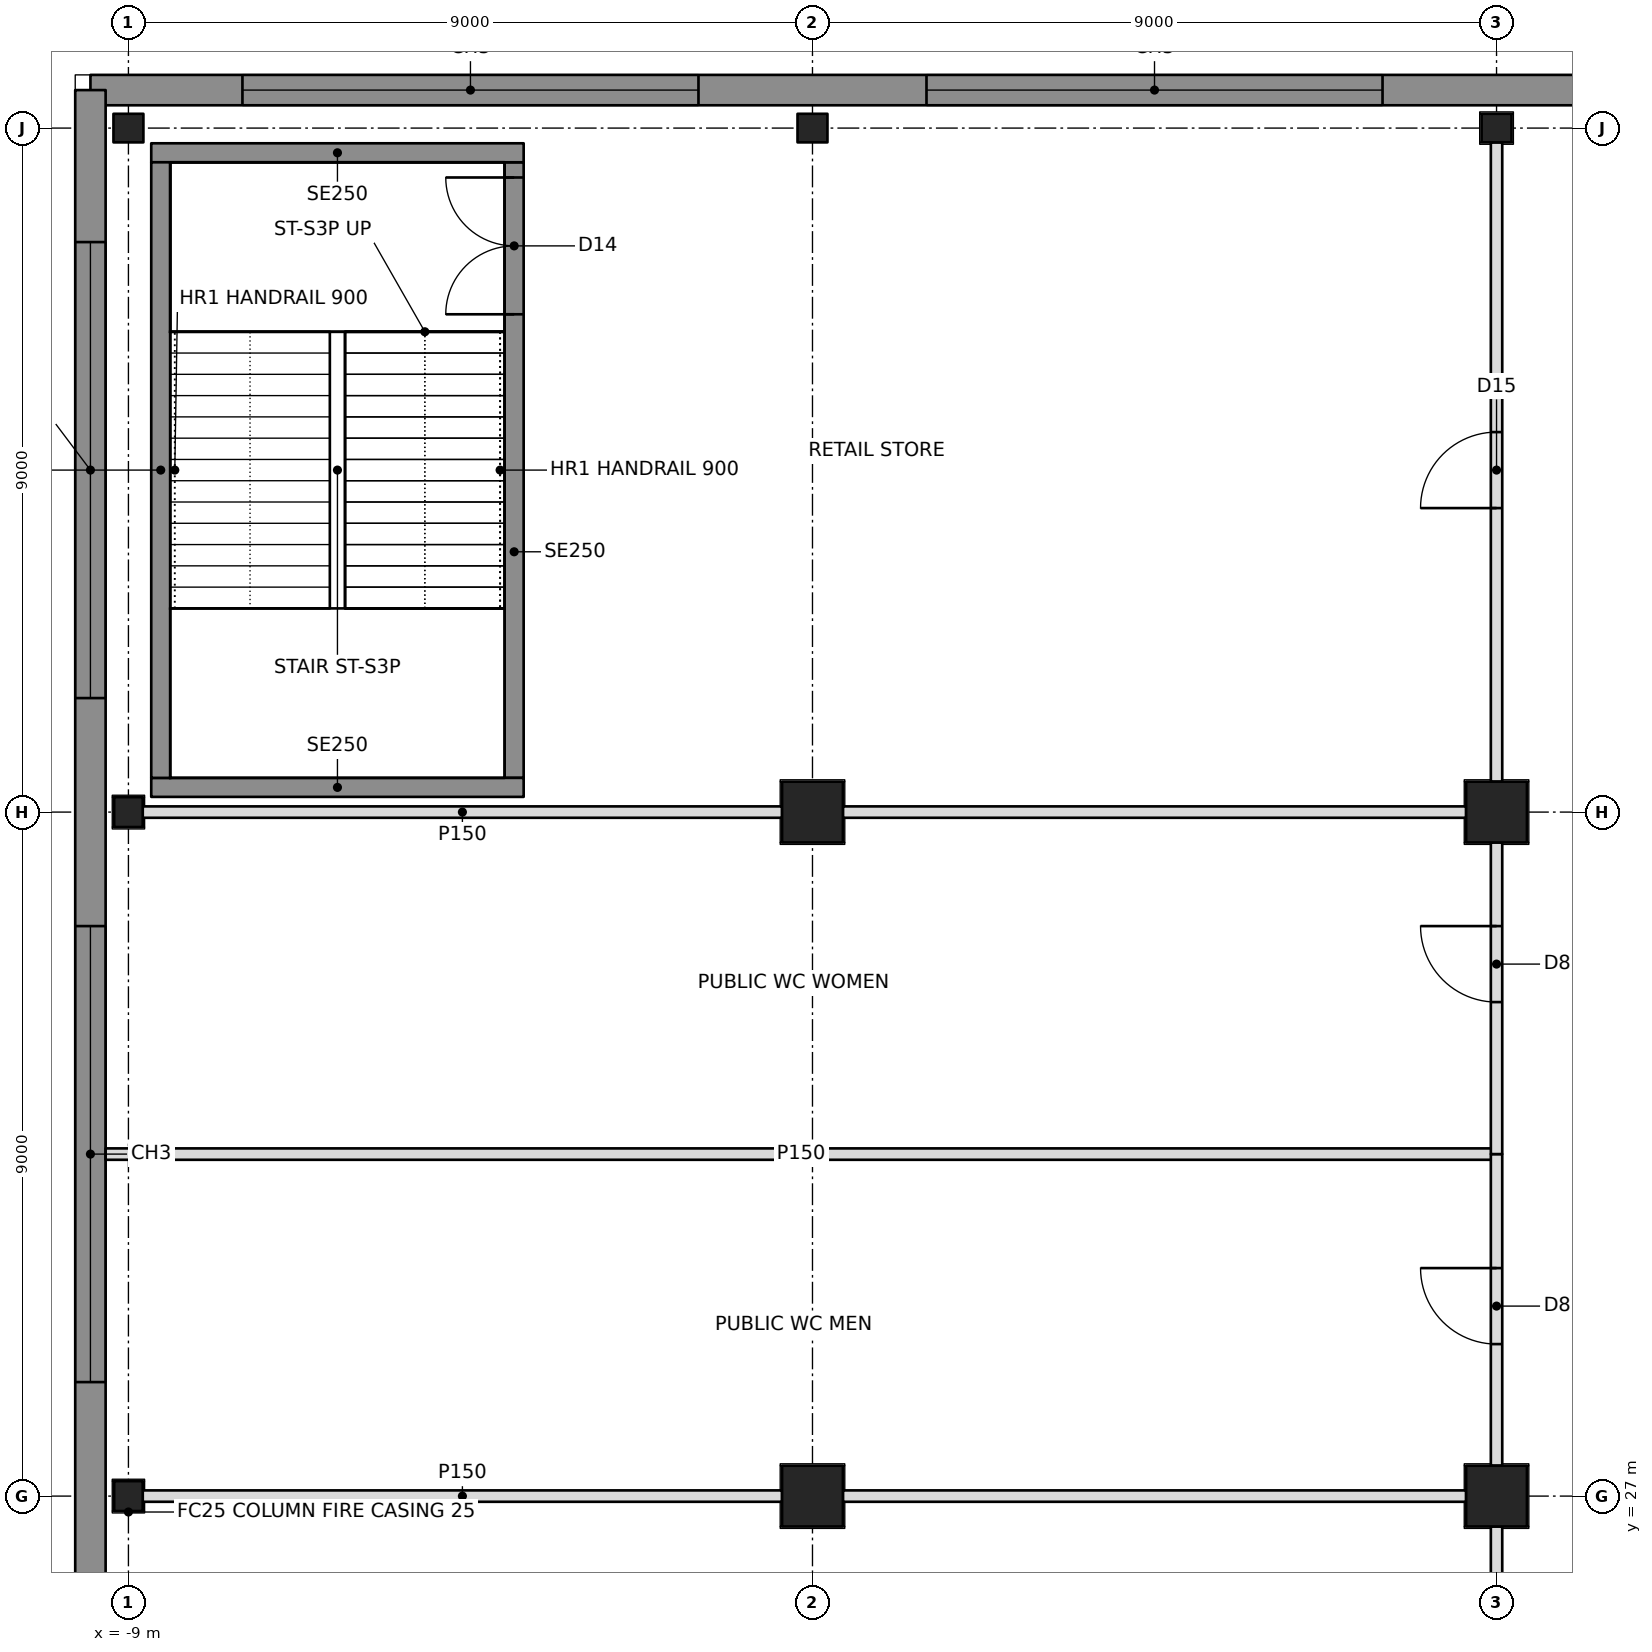
"""IFC4 building model, lengths in metres.
Left out: names, types, materials, properties, quantities, classifications, styles, units other than length and angle.
Written with IfcOpenShell. Run it as: python <this file> out.ifc"""

import sys

from ifc_helpers import new_model, si_unit, direction, frame, frame_2d, origin, origin_2d, place, context, subcontext, project, spatial, rectangle, hollow_rectangle, i_section, extrude, element, fill, save


model = new_model("IFC4")
c1 = context("Model", 3, precision=1e-05, world=origin(), true_north=direction((0.0, 1.0)))
c2 = subcontext(c1, "Body", "Model", "MODEL_VIEW")
j1 = project(units=[si_unit("LENGTHUNIT", "METRE"), si_unit("PLANEANGLEUNIT", "RADIAN")], contexts=[c1])
p1 = place(None, origin())
s1 = spatial("IfcSite", under=j1, at=p1, CompositionType="ELEMENT")
p2 = place(p1, origin())
s2 = spatial("IfcBuilding", under=s1, at=p2, CompositionType="ELEMENT")
p3 = place(p2, frame((0.0, 0.0, 6.0)))
s3 = spatial("IfcBuildingStorey", under=s2, at=p3, CompositionType="ELEMENT", Elevation=6.0)
for number, where, z_axis, x_axis in (
    (1, (-9.0, 27.0, 0.0), (0.0, 0.0, 1.0), (0.0, 1.0, 0.0)),
    (2, (-9.0, 36.0, 0.0), (0.0, 0.0, 1.0), (0.0, 1.0, 0.0)),
    (3, (-9.0, 45.0, 0.0), (0.0, 0.0, 1.0), (1.0, 0.0, 0.0)),
):
    element("IfcColumn", number, at=place(p3, frame(where, z_axis=z_axis, x_axis=x_axis)), inside=s3, PredefinedType="COLUMN", context=c2, shape_type="SweptSolid", body=[
        extrude(i_section(OverallWidth=0.394, OverallDepth=0.376, WebThickness=0.017, FlangeThickness=0.028, at=origin_2d()), origin(), (0.0, 0.0, 1.0), 5.0),
    ])
for number, where, z_axis, x_axis in (
    (4, (0.0, 27.0, 0.0), (0.0, 0.0, 1.0), (0.0, 1.0, 0.0)),
    (5, (0.0, 36.0, 0.0), (0.0, 0.0, 1.0), (1.0, 0.0, 0.0)),
):
    element("IfcColumn", number, at=place(p3, frame(where, z_axis=z_axis, x_axis=x_axis)), inside=s3, PredefinedType="COLUMN", context=c2, shape_type="SweptSolid", body=[
        extrude(hollow_rectangle(XDim=0.8, YDim=0.8, WallThickness=0.1, at=origin_2d()), origin(), (0.0, 0.0, 1.0), 5.0),
    ])
p4 = place(p3, frame((0.0, 45.0, 0.0), z_axis=(0.0, 0.0, 1.0), x_axis=(1.0, 0.0, 0.0)))
e6 = element("IfcColumn", 6, at=p4, inside=s3, PredefinedType="COLUMN", context=c2, shape_type="SweptSolid", body=[
    extrude(i_section(OverallWidth=0.394, OverallDepth=0.376, WebThickness=0.017, FlangeThickness=0.028, at=origin_2d()), origin(), (0.0, 0.0, 1.0), 5.0),
])
for number, where, z_axis, x_axis in (
    (7, (9.0, 27.0, 0.0), (0.0, 0.0, 1.0), (1.0, 0.0, 0.0)),
    (8, (9.0, 36.0, 0.0), (0.0, 0.0, 1.0), (1.0, 0.0, 0.0)),
):
    element("IfcColumn", number, at=place(p3, frame(where, z_axis=z_axis, x_axis=x_axis)), inside=s3, PredefinedType="COLUMN", context=c2, shape_type="SweptSolid", body=[
        extrude(hollow_rectangle(XDim=0.8, YDim=0.8, WallThickness=0.1, at=origin_2d()), origin(), (0.0, 0.0, 1.0), 5.0),
    ])
p5 = place(p3, frame((9.0, 45.0, 0.0), z_axis=(0.0, 0.0, 1.0), x_axis=(1.0, 0.0, 0.0)))
e9 = element("IfcColumn", 9, at=p5, inside=s3, PredefinedType="COLUMN", context=c2, shape_type="SweptSolid", body=[
    extrude(i_section(OverallWidth=0.394, OverallDepth=0.376, WebThickness=0.017, FlangeThickness=0.028, at=origin_2d()), origin(), (0.0, 0.0, 1.0), 5.0),
])
p6 = place(p3, frame((63.5, 45.5, 0.0), z_axis=(0.0, 0.0, 1.0), x_axis=(-1.0, 0.0, 0.0)))
e10 = element("IfcWall", 10, at=p6, inside=s3, PredefinedType="SOLIDWALL", context=c2, shape_type="SweptSolid", body=[
    extrude(rectangle(XDim=73.0, YDim=0.4, at=frame_2d((36.5, 0.0))), origin(), (0.0, 0.0, 1.0), 4.75),
])
p7 = place(p6, frame((2.0, 0.0, 0.9)))
e11 = element("IfcOpeningElement", 11, at=p7, cuts=e10, PredefinedType="OPENING", context=c2, shape_type="SweptSolid", body=[
    extrude(rectangle(XDim=6.0, YDim=2.6, at=frame_2d((3.0, 1.3))), frame((0.0, 0.21, 0.0), z_axis=(0.0, -1.0, 0.0), x_axis=(1.0, 0.0, 0.0)), (0.0, 0.0, 1.0), 0.42),
])
p8 = place(p6, frame((11.0, 0.0, 0.9)))
e12 = element("IfcOpeningElement", 12, at=p8, cuts=e10, PredefinedType="OPENING", context=c2, shape_type="SweptSolid", body=[
    extrude(rectangle(XDim=6.0, YDim=2.6, at=frame_2d((3.0, 1.3))), frame((0.0, 0.21, 0.0), z_axis=(0.0, -1.0, 0.0), x_axis=(1.0, 0.0, 0.0)), (0.0, 0.0, 1.0), 0.42),
])
p9 = place(p6, frame((20.0, 0.0, 0.9)))
e13 = element("IfcOpeningElement", 13, at=p9, cuts=e10, PredefinedType="OPENING", context=c2, shape_type="SweptSolid", body=[
    extrude(rectangle(XDim=6.0, YDim=2.6, at=frame_2d((3.0, 1.3))), frame((0.0, 0.21, 0.0), z_axis=(0.0, -1.0, 0.0), x_axis=(1.0, 0.0, 0.0)), (0.0, 0.0, 1.0), 0.42),
])
p10 = place(p6, frame((29.0, 0.0, 0.9)))
e14 = element("IfcOpeningElement", 14, at=p10, cuts=e10, PredefinedType="OPENING", context=c2, shape_type="SweptSolid", body=[
    extrude(rectangle(XDim=6.0, YDim=2.6, at=frame_2d((3.0, 1.3))), frame((0.0, 0.21, 0.0), z_axis=(0.0, -1.0, 0.0), x_axis=(1.0, 0.0, 0.0)), (0.0, 0.0, 1.0), 0.42),
])
p11 = place(p6, frame((38.0, 0.0, 0.9)))
e15 = element("IfcOpeningElement", 15, at=p11, cuts=e10, PredefinedType="OPENING", context=c2, shape_type="SweptSolid", body=[
    extrude(rectangle(XDim=6.0, YDim=2.6, at=frame_2d((3.0, 1.3))), frame((0.0, 0.21, 0.0), z_axis=(0.0, -1.0, 0.0), x_axis=(1.0, 0.0, 0.0)), (0.0, 0.0, 1.0), 0.42),
])
p12 = place(p6, frame((47.0, 0.0, 0.9)))
e16 = element("IfcOpeningElement", 16, at=p12, cuts=e10, PredefinedType="OPENING", context=c2, shape_type="SweptSolid", body=[
    extrude(rectangle(XDim=6.0, YDim=2.6, at=frame_2d((3.0, 1.3))), frame((0.0, 0.21, 0.0), z_axis=(0.0, -1.0, 0.0), x_axis=(1.0, 0.0, 0.0)), (0.0, 0.0, 1.0), 0.42),
])
p13 = place(p6, frame((56.0, 0.0, 0.9)))
e17 = element("IfcOpeningElement", 17, at=p13, cuts=e10, PredefinedType="OPENING", context=c2, shape_type="SweptSolid", body=[
    extrude(rectangle(XDim=6.0, YDim=2.6, at=frame_2d((3.0, 1.3))), frame((0.0, 0.21, 0.0), z_axis=(0.0, -1.0, 0.0), x_axis=(1.0, 0.0, 0.0)), (0.0, 0.0, 1.0), 0.42),
])
p14 = place(p6, frame((65.0, 0.0, 0.9)))
e18 = element("IfcOpeningElement", 18, at=p14, cuts=e10, PredefinedType="OPENING", context=c2, shape_type="SweptSolid", body=[
    extrude(rectangle(XDim=6.0, YDim=2.6, at=frame_2d((3.0, 1.3))), frame((0.0, 0.21, 0.0), z_axis=(0.0, -1.0, 0.0), x_axis=(1.0, 0.0, 0.0)), (0.0, 0.0, 1.0), 0.42),
])
p15 = place(p3, frame((-9.5, 45.5, 0.0), z_axis=(0.0, 0.0, 1.0), x_axis=(0.0, -1.0, 0.0)))
e19 = element("IfcWall", 19, at=p15, inside=s3, PredefinedType="SOLIDWALL", context=c2, shape_type="SweptSolid", body=[
    extrude(rectangle(XDim=73.0, YDim=0.4, at=frame_2d((36.5, 0.0))), origin(), (0.0, 0.0, 1.0), 4.75),
])
p16 = place(p15, frame((2.0, 0.0, 0.9)))
e20 = element("IfcOpeningElement", 20, at=p16, cuts=e19, PredefinedType="OPENING", context=c2, shape_type="SweptSolid", body=[
    extrude(rectangle(XDim=6.0, YDim=2.6, at=frame_2d((3.0, 1.3))), frame((0.0, 0.21, 0.0), z_axis=(0.0, -1.0, 0.0), x_axis=(1.0, 0.0, 0.0)), (0.0, 0.0, 1.0), 0.42),
])
p17 = place(p15, frame((11.0, 0.0, 0.9)))
e21 = element("IfcOpeningElement", 21, at=p17, cuts=e19, PredefinedType="OPENING", context=c2, shape_type="SweptSolid", body=[
    extrude(rectangle(XDim=6.0, YDim=2.6, at=frame_2d((3.0, 1.3))), frame((0.0, 0.21, 0.0), z_axis=(0.0, -1.0, 0.0), x_axis=(1.0, 0.0, 0.0)), (0.0, 0.0, 1.0), 0.42),
])
p18 = place(p15, frame((20.0, 0.0, 0.9)))
e22 = element("IfcOpeningElement", 22, at=p18, cuts=e19, PredefinedType="OPENING", context=c2, shape_type="SweptSolid", body=[
    extrude(rectangle(XDim=6.0, YDim=2.6, at=frame_2d((3.0, 1.3))), frame((0.0, 0.21, 0.0), z_axis=(0.0, -1.0, 0.0), x_axis=(1.0, 0.0, 0.0)), (0.0, 0.0, 1.0), 0.42),
])
p19 = place(p15, frame((29.0, 0.0, 0.9)))
e23 = element("IfcOpeningElement", 23, at=p19, cuts=e19, PredefinedType="OPENING", context=c2, shape_type="SweptSolid", body=[
    extrude(rectangle(XDim=6.0, YDim=2.6, at=frame_2d((3.0, 1.3))), frame((0.0, 0.21, 0.0), z_axis=(0.0, -1.0, 0.0), x_axis=(1.0, 0.0, 0.0)), (0.0, 0.0, 1.0), 0.42),
])
p20 = place(p15, frame((38.0, 0.0, 0.9)))
e24 = element("IfcOpeningElement", 24, at=p20, cuts=e19, PredefinedType="OPENING", context=c2, shape_type="SweptSolid", body=[
    extrude(rectangle(XDim=6.0, YDim=2.6, at=frame_2d((3.0, 1.3))), frame((0.0, 0.21, 0.0), z_axis=(0.0, -1.0, 0.0), x_axis=(1.0, 0.0, 0.0)), (0.0, 0.0, 1.0), 0.42),
])
p21 = place(p15, frame((47.0, 0.0, 0.9)))
e25 = element("IfcOpeningElement", 25, at=p21, cuts=e19, PredefinedType="OPENING", context=c2, shape_type="SweptSolid", body=[
    extrude(rectangle(XDim=6.0, YDim=2.6, at=frame_2d((3.0, 1.3))), frame((0.0, 0.21, 0.0), z_axis=(0.0, -1.0, 0.0), x_axis=(1.0, 0.0, 0.0)), (0.0, 0.0, 1.0), 0.42),
])
p22 = place(p15, frame((56.0, 0.0, 0.9)))
e26 = element("IfcOpeningElement", 26, at=p22, cuts=e19, PredefinedType="OPENING", context=c2, shape_type="SweptSolid", body=[
    extrude(rectangle(XDim=6.0, YDim=2.6, at=frame_2d((3.0, 1.3))), frame((0.0, 0.21, 0.0), z_axis=(0.0, -1.0, 0.0), x_axis=(1.0, 0.0, 0.0)), (0.0, 0.0, 1.0), 0.42),
])
p23 = place(p15, frame((65.0, 0.0, 0.9)))
e27 = element("IfcOpeningElement", 27, at=p23, cuts=e19, PredefinedType="OPENING", context=c2, shape_type="SweptSolid", body=[
    extrude(rectangle(XDim=6.0, YDim=2.6, at=frame_2d((3.0, 1.3))), frame((0.0, 0.21, 0.0), z_axis=(0.0, -1.0, 0.0), x_axis=(1.0, 0.0, 0.0)), (0.0, 0.0, 1.0), 0.42),
])
p24 = place(p3, frame((-8.812, 27.0, 0.0), z_axis=(0.0, 0.0, 1.0), x_axis=(1.0, 0.0, 0.0)))
e28 = element("IfcWall", 28, at=p24, inside=s3, PredefinedType="PARTITIONING", context=c2, shape_type="SweptSolid", body=[
    extrude(rectangle(XDim=8.412, YDim=0.15, at=frame_2d((4.206, 0.0))), origin(), (0.0, 0.0, 1.0), 3.892),
])
p25 = place(p3, frame((0.4, 27.0, 0.0), z_axis=(0.0, 0.0, 1.0), x_axis=(1.0, 0.0, 0.0)))
e29 = element("IfcWall", 29, at=p25, inside=s3, PredefinedType="PARTITIONING", context=c2, shape_type="SweptSolid", body=[
    extrude(rectangle(XDim=8.2, YDim=0.15, at=frame_2d((4.1, 0.0))), origin(), (0.0, 0.0, 1.0), 3.892),
])
p26 = place(p3, frame((-9.3, 31.5, 0.0), z_axis=(0.0, 0.0, 1.0), x_axis=(1.0, 0.0, 0.0)))
e30 = element("IfcWall", 30, at=p26, inside=s3, PredefinedType="PARTITIONING", context=c2, shape_type="SweptSolid", body=[
    extrude(rectangle(XDim=18.3, YDim=0.15, at=frame_2d((9.15, 0.0))), origin(), (0.0, 0.0, 1.0), 3.891),
])
p27 = place(p3, frame((-8.812, 36.0, 0.0), z_axis=(0.0, 0.0, 1.0), x_axis=(1.0, 0.0, 0.0)))
e31 = element("IfcWall", 31, at=p27, inside=s3, PredefinedType="PARTITIONING", context=c2, shape_type="SweptSolid", body=[
    extrude(rectangle(XDim=8.412, YDim=0.15, at=frame_2d((4.206, 0.0))), origin(), (0.0, 0.0, 1.0), 3.892),
])
for number, where, z_axis, x_axis in (
    (32, (0.4, 36.0, 0.0), (0.0, 0.0, 1.0), (1.0, 0.0, 0.0)),
    (33, (9.0, 26.6, 0.0), (0.0, 0.0, 1.0), (0.0, -1.0, 0.0)),
):
    element("IfcWall", number, at=place(p3, frame(where, z_axis=z_axis, x_axis=x_axis)), inside=s3, PredefinedType="PARTITIONING", context=c2, shape_type="SweptSolid", body=[
        extrude(rectangle(XDim=8.2, YDim=0.15, at=frame_2d((4.1, 0.0))), origin(), (0.0, 0.0, 1.0), 3.892),
    ])
p28 = place(p3, frame((9.0, 31.5, 0.0), z_axis=(0.0, 0.0, 1.0), x_axis=(0.0, -1.0, 0.0)))
e34 = element("IfcWall", 34, at=p28, inside=s3, PredefinedType="PARTITIONING", context=c2, shape_type="SweptSolid", body=[
    extrude(rectangle(XDim=4.1, YDim=0.15, at=frame_2d((2.05, 0.0))), origin(), (0.0, 0.0, 1.0), 3.892),
])
p29 = place(p28, frame((1.5, 0.0, 0.0)))
e35 = element("IfcOpeningElement", 35, at=p29, cuts=e34, PredefinedType="OPENING", context=c2, shape_type="SweptSolid", body=[
    extrude(rectangle(XDim=1.0, YDim=2.1, at=frame_2d((0.5, 1.05))), frame((0.0, 0.085, 0.0), z_axis=(0.0, -1.0, 0.0), x_axis=(1.0, 0.0, 0.0)), (0.0, 0.0, 1.0), 0.17),
])
p30 = place(p3, frame((9.0, 35.6, 0.0), z_axis=(0.0, 0.0, 1.0), x_axis=(0.0, -1.0, 0.0)))
e36 = element("IfcWall", 36, at=p30, inside=s3, PredefinedType="PARTITIONING", context=c2, shape_type="SweptSolid", body=[
    extrude(rectangle(XDim=4.1, YDim=0.15, at=frame_2d((2.05, 0.0))), origin(), (0.0, 0.0, 1.0), 3.892),
])
p31 = place(p30, frame((1.1, 0.0, 0.0)))
e37 = element("IfcOpeningElement", 37, at=p31, cuts=e36, PredefinedType="OPENING", context=c2, shape_type="SweptSolid", body=[
    extrude(rectangle(XDim=1.0, YDim=2.1, at=frame_2d((0.5, 1.05))), frame((0.0, 0.085, 0.0), z_axis=(0.0, -1.0, 0.0), x_axis=(1.0, 0.0, 0.0)), (0.0, 0.0, 1.0), 0.17),
])
p32 = place(p3, frame((9.0, 44.812, 0.0), z_axis=(0.0, 0.0, 1.0), x_axis=(0.0, -1.0, 0.0)))
e38 = element("IfcWall", 38, at=p32, inside=s3, PredefinedType="PARTITIONING", context=c2, shape_type="SweptSolid", body=[
    extrude(rectangle(XDim=8.412, YDim=0.15, at=frame_2d((4.206, 0.0))), origin(), (0.0, 0.0, 1.0), 3.892),
])
p33 = place(p32, frame((3.812, 0.0, 0.0)))
e39 = element("IfcOpeningElement", 39, at=p33, cuts=e38, PredefinedType="OPENING", context=c2, shape_type="SweptSolid", body=[
    extrude(rectangle(XDim=1.0, YDim=2.1, at=frame_2d((0.5, 1.05))), frame((0.0, 0.085, 0.0), z_axis=(0.0, -1.0, 0.0), x_axis=(1.0, 0.0, 0.0)), (0.0, 0.0, 1.0), 0.17),
])
for number, where, z_axis, x_axis in (
    (40, (-8.7, 36.325, 0.0), (0.0, 0.0, 1.0), (1.0, 0.0, 0.0)),
    (41, (-8.7, 44.675, 0.0), (0.0, 0.0, 1.0), (1.0, 0.0, 0.0)),
):
    element("IfcWall", number, at=place(p3, frame(where, z_axis=z_axis, x_axis=x_axis)), inside=s3, PredefinedType="SOLIDWALL", context=c2, shape_type="SweptSolid", body=[
        extrude(rectangle(XDim=4.9, YDim=0.25, at=frame_2d((2.45, 0.0))), origin(), (0.0, 0.0, 1.0), 4.75),
    ])
p34 = place(p3, frame((-8.575, 36.45, 0.0), z_axis=(0.0, 0.0, 1.0), x_axis=(0.0, 1.0, 0.0)))
e42 = element("IfcWall", 42, at=p34, inside=s3, PredefinedType="SOLIDWALL", context=c2, shape_type="SweptSolid", body=[
    extrude(rectangle(XDim=8.1, YDim=0.25, at=frame_2d((4.05, 0.0))), origin(), (0.0, 0.0, 1.0), 4.75),
])
p35 = place(p3, frame((-3.925, 36.45, 0.0), z_axis=(0.0, 0.0, 1.0), x_axis=(0.0, 1.0, 0.0)))
e43 = element("IfcWall", 43, at=p35, inside=s3, PredefinedType="SOLIDWALL", context=c2, shape_type="SweptSolid", body=[
    extrude(rectangle(XDim=8.1, YDim=0.25, at=frame_2d((4.05, 0.0))), origin(), (0.0, 0.0, 1.0), 4.75),
])
p36 = place(p35, frame((6.1, 0.0, 0.0)))
e44 = element("IfcOpeningElement", 44, at=p36, cuts=e43, PredefinedType="OPENING", context=c2, shape_type="SweptSolid", body=[
    extrude(rectangle(XDim=1.8, YDim=2.1, at=frame_2d((0.9, 1.05))), frame((0.0, 0.135, 0.0), z_axis=(0.0, -1.0, 0.0), x_axis=(1.0, 0.0, 0.0)), (0.0, 0.0, 1.0), 0.27),
])
p37 = place(p13, origin())
e45 = element("IfcWindow", 45, at=p37, inside=s3, PartitioningType="TRIPLE_PANEL_VERTICAL", PredefinedType="WINDOW", context=c2, shape_type="SweptSolid", body=[
    extrude(rectangle(XDim=6.0, YDim=2.6, at=frame_2d((3.0, 1.3))), frame((0.0, 0.03, 0.0), z_axis=(0.0, -1.0, 0.0), x_axis=(1.0, 0.0, 0.0)), (0.0, 0.0, 1.0), 0.06),
])
fill(e17, e45)
p38 = place(p14, origin())
e46 = element("IfcWindow", 46, at=p38, inside=s3, PartitioningType="TRIPLE_PANEL_VERTICAL", PredefinedType="WINDOW", context=c2, shape_type="SweptSolid", body=[
    extrude(rectangle(XDim=6.0, YDim=2.6, at=frame_2d((3.0, 1.3))), frame((0.0, 0.03, 0.0), z_axis=(0.0, -1.0, 0.0), x_axis=(1.0, 0.0, 0.0)), (0.0, 0.0, 1.0), 0.06),
])
fill(e18, e46)
p39 = place(p16, origin())
e47 = element("IfcWindow", 47, at=p39, inside=s3, PartitioningType="TRIPLE_PANEL_VERTICAL", PredefinedType="WINDOW", context=c2, shape_type="SweptSolid", body=[
    extrude(rectangle(XDim=6.0, YDim=2.6, at=frame_2d((3.0, 1.3))), frame((0.0, 0.03, 0.0), z_axis=(0.0, -1.0, 0.0), x_axis=(1.0, 0.0, 0.0)), (0.0, 0.0, 1.0), 0.06),
])
fill(e20, e47)
p40 = place(p17, origin())
e48 = element("IfcWindow", 48, at=p40, inside=s3, PartitioningType="TRIPLE_PANEL_VERTICAL", PredefinedType="WINDOW", context=c2, shape_type="SweptSolid", body=[
    extrude(rectangle(XDim=6.0, YDim=2.6, at=frame_2d((3.0, 1.3))), frame((0.0, 0.03, 0.0), z_axis=(0.0, -1.0, 0.0), x_axis=(1.0, 0.0, 0.0)), (0.0, 0.0, 1.0), 0.06),
])
fill(e21, e48)
p41 = place(p29, frame((1.0, 0.0, 0.0), z_axis=(0.0, 0.0, 1.0), x_axis=(-1.0, 0.0, 0.0)))
e49 = element("IfcDoor", 49, at=p41, inside=s3, OperationType="SINGLE_SWING_RIGHT", PredefinedType="DOOR", context=c2, shape_type="SweptSolid", body=[
    extrude(rectangle(XDim=1.0, YDim=2.1, at=frame_2d((0.5, 1.05))), frame((0.0, 0.025, 0.0), z_axis=(0.0, -1.0, 0.0), x_axis=(1.0, 0.0, 0.0)), (0.0, 0.0, 1.0), 0.05),
])
fill(e35, e49)
p42 = place(p31, frame((1.0, 0.0, 0.0), z_axis=(0.0, 0.0, 1.0), x_axis=(-1.0, 0.0, 0.0)))
e50 = element("IfcDoor", 50, at=p42, inside=s3, OperationType="SINGLE_SWING_RIGHT", PredefinedType="DOOR", context=c2, shape_type="SweptSolid", body=[
    extrude(rectangle(XDim=1.0, YDim=2.1, at=frame_2d((0.5, 1.05))), frame((0.0, 0.025, 0.0), z_axis=(0.0, -1.0, 0.0), x_axis=(1.0, 0.0, 0.0)), (0.0, 0.0, 1.0), 0.05),
])
fill(e37, e50)
p43 = place(p33, frame((1.0, 0.0, 0.0), z_axis=(0.0, 0.0, 1.0), x_axis=(-1.0, 0.0, 0.0)))
e51 = element("IfcDoor", 51, at=p43, inside=s3, OperationType="SINGLE_SWING_LEFT", PredefinedType="DOOR", context=c2, shape_type="SweptSolid", body=[
    extrude(rectangle(XDim=1.0, YDim=2.1, at=frame_2d((0.5, 1.05))), frame((0.0, 0.025, 0.0), z_axis=(0.0, -1.0, 0.0), x_axis=(1.0, 0.0, 0.0)), (0.0, 0.0, 1.0), 0.05),
])
fill(e39, e51)
p44 = place(p36, origin())
e52 = element("IfcDoor", 52, at=p44, inside=s3, OperationType="DOUBLE_DOOR_SINGLE_SWING", PredefinedType="DOOR", context=c2, shape_type="SweptSolid", body=[
    extrude(rectangle(XDim=1.8, YDim=2.1, at=frame_2d((0.9, 1.05))), frame((0.0, 0.025, 0.0), z_axis=(0.0, -1.0, 0.0), x_axis=(1.0, 0.0, 0.0)), (0.0, 0.0, 1.0), 0.05),
])
fill(e44, e52)
save(model, sys.argv[1])
